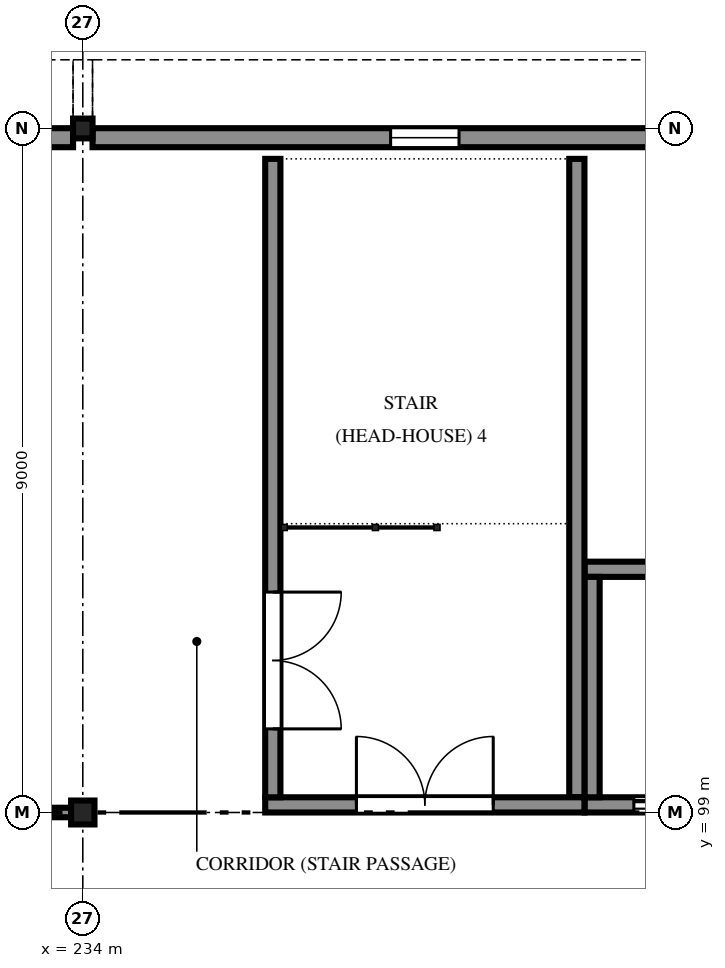
"""IFC4 building model, lengths in metres.
Left out: names, types, materials, properties, quantities, classifications, styles, units other than length and angle.
Written with IfcOpenShell. Run it as: python <this file> out.ifc"""

import sys

from ifc_helpers import new_model, si_unit, direction, frame, frame_2d, origin, origin_2d, place, context, subcontext, project, spatial, polyline, rectangle, i_section, outline, extrude, element, fill, save


model = new_model("IFC4")
c1 = context("Model", 3, precision=1e-05, world=origin(), true_north=direction((0.0, 1.0)))
c2 = subcontext(c1, "Body", "Model", "MODEL_VIEW")
j1 = project(units=[si_unit("LENGTHUNIT", "METRE"), si_unit("PLANEANGLEUNIT", "RADIAN")], contexts=[c1])
p1 = place(None, origin())
s1 = spatial("IfcSite", under=j1, at=p1, CompositionType="ELEMENT")
p2 = place(p1, origin())
s2 = spatial("IfcBuilding", under=s1, at=p2, CompositionType="ELEMENT")
p3 = place(p2, frame((0.0, 0.0, 7.5)))
s3 = spatial("IfcBuildingStorey", under=s2, at=p3, CompositionType="ELEMENT", Elevation=7.5)
p4 = place(p3, frame((234.0, 99.0, 0.0), z_axis=(0.0, 0.0, 1.0), x_axis=(1.0, 0.0, 0.0)))
e1 = element("IfcColumn", 1, at=p4, inside=s3, PredefinedType="COLUMN", context=c2, shape_type="SweptSolid", body=[
    extrude(i_section(OverallWidth=0.307, OverallDepth=0.314, WebThickness=0.012, FlangeThickness=0.019, FilletRadius=0.015, at=origin_2d()), origin(), (0.0, 0.0, 1.0), 4.2),
])
p5 = place(p3, frame((234.0, 108.0, 0.0), z_axis=(0.0, 0.0, 1.0), x_axis=(1.0, 0.0, 0.0)))
e2 = element("IfcColumn", 2, at=p5, inside=s3, PredefinedType="COLUMN", context=c2, shape_type="SweptSolid", body=[
    extrude(i_section(OverallWidth=0.256, OverallDepth=0.26, WebThickness=0.01, FlangeThickness=0.017, FilletRadius=0.013, at=origin_2d()), origin(), (0.0, 0.0, 1.0), 4.2),
])
p6 = place(p3, frame((225.128, 107.878, 0.0), z_axis=(0.0, 0.0, 1.0), x_axis=(1.0, 0.0, 0.0)))
e3 = element("IfcWall", 3, at=p6, inside=s3, PredefinedType="SOLIDWALL", context=c2, shape_type="SweptSolid", body=[
    extrude(rectangle(XDim=8.744, YDim=0.25, at=frame_2d((4.372, 0.0))), origin(), (0.0, 0.0, 1.0), 4.05),
])
p7 = place(p6, frame((0.622, 0.0, 0.9)))
e4 = element("IfcOpeningElement", 4, at=p7, cuts=e3, PredefinedType="OPENING", context=c2, shape_type="SweptSolid", body=[
    extrude(rectangle(XDim=1.5, YDim=2.4, at=frame_2d((0.75, 1.2))), frame((0.0, 0.135, 0.0), z_axis=(0.0, -1.0, 0.0), x_axis=(1.0, 0.0, 0.0)), (0.0, 0.0, 1.0), 0.27),
])
p8 = place(p6, frame((3.622, 0.0, 0.9)))
e5 = element("IfcOpeningElement", 5, at=p8, cuts=e3, PredefinedType="OPENING", context=c2, shape_type="SweptSolid", body=[
    extrude(rectangle(XDim=1.5, YDim=2.4, at=frame_2d((0.75, 1.2))), frame((0.0, 0.135, 0.0), z_axis=(0.0, -1.0, 0.0), x_axis=(1.0, 0.0, 0.0)), (0.0, 0.0, 1.0), 0.27),
])
p9 = place(p6, frame((6.622, 0.0, 0.9)))
e6 = element("IfcOpeningElement", 6, at=p9, cuts=e3, PredefinedType="OPENING", context=c2, shape_type="SweptSolid", body=[
    extrude(rectangle(XDim=1.5, YDim=2.4, at=frame_2d((0.75, 1.2))), frame((0.0, 0.135, 0.0), z_axis=(0.0, -1.0, 0.0), x_axis=(1.0, 0.0, 0.0)), (0.0, 0.0, 1.0), 0.27),
])
p10 = place(p3, frame((234.128, 107.878, 0.0), z_axis=(0.0, 0.0, 1.0), x_axis=(1.0, 0.0, 0.0)))
e7 = element("IfcWall", 7, at=p10, inside=s3, PredefinedType="SOLIDWALL", context=c2, shape_type="SweptSolid", body=[
    extrude(rectangle(XDim=8.744, YDim=0.25, at=frame_2d((4.372, 0.0))), origin(), (0.0, 0.0, 1.0), 4.05),
])
p11 = place(p10, frame((3.922, 0.0, 1.2)))
e8 = element("IfcOpeningElement", 8, at=p11, cuts=e7, PredefinedType="OPENING", context=c2, shape_type="SweptSolid", body=[
    extrude(rectangle(XDim=0.9, YDim=1.8, at=frame_2d((0.45, 0.9))), frame((0.0, 0.135, 0.0), z_axis=(0.0, -1.0, 0.0), x_axis=(1.0, 0.0, 0.0)), (0.0, 0.0, 1.0), 0.27),
])
p12 = place(p3, frame((236.4, 99.1, -0.13), z_axis=(0.0, 0.0, 1.0), x_axis=(1.0, 0.0, 0.0)))
e9 = element("IfcWall", 9, at=p12, inside=s3, PredefinedType="SOLIDWALL", context=c2, shape_type="SweptSolid", body=[
    extrude(rectangle(XDim=4.2, YDim=0.2, at=frame_2d((2.1, 0.0))), origin(), (0.0, 0.0, 1.0), 3.72),
])
p13 = place(p12, frame((1.2, 0.0, 0.13)))
e10 = element("IfcOpeningElement", 10, at=p13, cuts=e9, PredefinedType="OPENING", context=c2, shape_type="SweptSolid", body=[
    extrude(rectangle(XDim=1.8, YDim=2.1, at=frame_2d((0.9, 1.05))), frame((0.0, 0.11, 0.0), z_axis=(0.0, -1.0, 0.0), x_axis=(1.0, 0.0, 0.0)), (0.0, 0.0, 1.0), 0.22),
])
p14 = place(p3, frame((236.5, 99.2, -0.13), z_axis=(0.0, 0.0, 1.0), x_axis=(0.0, 1.0, 0.0)))
e11 = element("IfcWall", 11, at=p14, inside=s3, PredefinedType="SOLIDWALL", context=c2, shape_type="SweptSolid", body=[
    extrude(rectangle(XDim=8.4, YDim=0.2, at=frame_2d((4.2, 0.0))), origin(), (0.0, 0.0, 1.0), 3.72),
])
p15 = place(p14, frame((0.9, 0.0, 0.13)))
e12 = element("IfcOpeningElement", 12, at=p15, cuts=e11, PredefinedType="OPENING", context=c2, shape_type="SweptSolid", body=[
    extrude(rectangle(XDim=1.8, YDim=2.1, at=frame_2d((0.9, 1.05))), frame((0.0, 0.11, 0.0), z_axis=(0.0, -1.0, 0.0), x_axis=(1.0, 0.0, 0.0)), (0.0, 0.0, 1.0), 0.22),
])
p16 = place(p3, frame((240.5, 99.2, -0.13), z_axis=(0.0, 0.0, 1.0), x_axis=(0.0, 1.0, 0.0)))
e13 = element("IfcWall", 13, at=p16, inside=s3, PredefinedType="SOLIDWALL", context=c2, shape_type="SweptSolid", body=[
    extrude(rectangle(XDim=8.4, YDim=0.2, at=frame_2d((4.2, 0.0))), origin(), (0.0, 0.0, 1.0), 3.72),
])
p17 = place(p3, frame((240.602, 99.1, 0.0), z_axis=(0.0, 0.0, 1.0), x_axis=(1.0, 0.0, 0.0)))
e14 = element("IfcWall", 14, at=p17, inside=s3, PredefinedType="SOLIDWALL", context=c2, shape_type="SweptSolid", body=[
    extrude(rectangle(XDim=2.398, YDim=0.2, at=frame_2d((1.199, 0.0))), origin(), (0.0, 0.0, 1.0), 3.516),
])
p18 = place(p17, frame((0.648, 0.0, 0.0)))
e15 = element("IfcOpeningElement", 15, at=p18, cuts=e14, PredefinedType="OPENING", context=c2, shape_type="SweptSolid", body=[
    extrude(rectangle(XDim=1.1, YDim=2.1, at=frame_2d((0.55, 1.05))), frame((0.0, 0.11, 0.0), z_axis=(0.0, -1.0, 0.0), x_axis=(1.0, 0.0, 0.0)), (0.0, 0.0, 1.0), 0.22),
])
p19 = place(p3, frame((240.602, 102.2, 0.0), z_axis=(0.0, 0.0, 1.0), x_axis=(1.0, 0.0, 0.0)))
e16 = element("IfcWall", 16, at=p19, inside=s3, PredefinedType="SOLIDWALL", context=c2, shape_type="SweptSolid", body=[
    extrude(rectangle(XDim=2.256, YDim=0.2, at=frame_2d((1.128, 0.0))), origin(), (0.0, 0.0, 1.0), 3.516),
])
p20 = place(p3, frame((240.7, 99.2, 0.0), z_axis=(0.0, 0.0, 1.0), x_axis=(0.0, 1.0, 0.0)))
e17 = element("IfcWall", 17, at=p20, inside=s3, PredefinedType="SOLIDWALL", context=c2, shape_type="SweptSolid", body=[
    extrude(rectangle(XDim=2.9, YDim=0.2, at=frame_2d((1.45, 0.0))), origin(), (0.0, 0.0, 1.0), 3.516),
])
p21 = place(p3, frame((225.154, 99.0, 0.0), z_axis=(0.0, 0.0, 1.0), x_axis=(1.0, 0.0, 0.0)))
e18 = element("IfcWall", 18, at=p21, inside=s3, PredefinedType="PARTITIONING", context=c2, shape_type="SweptSolid", body=[
    extrude(rectangle(XDim=8.692, YDim=0.125, at=frame_2d((4.346, 0.0))), origin(), (0.0, 0.0, 1.0), 3.307),
])
p22 = place(p21, frame((3.846, 0.0, 0.0)))
e19 = element("IfcOpeningElement", 19, at=p22, cuts=e18, PredefinedType="OPENING", context=c2, shape_type="SweptSolid", body=[
    extrude(rectangle(XDim=1.0, YDim=2.1, at=frame_2d((0.5, 1.05))), frame((0.0, 0.073, 0.0), z_axis=(0.0, -1.0, 0.0), x_axis=(1.0, 0.0, 0.0)), (0.0, 0.0, 1.0), 0.145),
])
p23 = place(p11, origin())
e20 = element("IfcWindow", 20, at=p23, inside=s3, PartitioningType="SINGLE_PANEL", PredefinedType="WINDOW", context=c2, shape_type="SweptSolid", body=[
    extrude(outline(polyline([(0.0, 0.0), (0.9, 0.0), (0.9, 1.8), (0.0, 1.8), (0.0, 0.0)]), holes=[polyline([(0.07, 0.07), (0.83, 0.07), (0.83, 1.73), (0.07, 1.73), (0.07, 0.07)])]), frame((0.0, 0.03, 0.0), z_axis=(0.0, -1.0, 0.0), x_axis=(1.0, 0.0, 0.0)), (0.0, 0.0, 1.0), 0.06),
    extrude(outline(polyline([(0.07, 0.07), (0.83, 0.07), (0.83, 1.73), (0.07, 1.73), (0.07, 0.07)]), holes=[polyline([(0.1, 0.1), (0.8, 0.1), (0.8, 1.7), (0.1, 1.7), (0.1, 0.1)])]), frame((0.0, 0.022, 0.0), z_axis=(0.0, -1.0, 0.0), x_axis=(1.0, 0.0, 0.0)), (0.0, 0.0, 1.0), 0.045),
    extrude(rectangle(XDim=0.7, YDim=1.6, at=frame_2d((0.45, 0.9))), frame((0.0, 0.006, 0.0), z_axis=(0.0, -1.0, 0.0), x_axis=(1.0, 0.0, 0.0)), (0.0, 0.0, 1.0), 0.012),
])
fill(e8, e20)
p24 = place(p18, origin())
e21 = element("IfcDoor", 21, at=p24, inside=s3, OperationType="SLIDING_TO_LEFT", PredefinedType="DOOR", context=c2, shape_type="SweptSolid", body=[
    extrude(outline(polyline([(0.0, 0.0), (0.07, 0.0), (0.07, 2.03), (1.03, 2.03), (1.03, 0.0), (1.1, 0.0), (1.1, 2.1), (0.0, 2.1), (0.0, 0.0)])), frame((0.0, 0.025, 0.0), z_axis=(0.0, -1.0, 0.0), x_axis=(1.0, 0.0, 0.0)), (0.0, 0.0, 1.0), 0.05),
    extrude(rectangle(XDim=0.524, YDim=2.016, at=frame_2d((0.336, 1.018))), frame((0.0, 0.018, 0.0), z_axis=(0.0, -1.0, 0.0), x_axis=(1.0, 0.0, 0.0)), (0.0, 0.0, 1.0), 0.016),
    extrude(rectangle(XDim=0.52, YDim=2.016, at=frame_2d((0.766, 1.018))), frame((0.0, -0.002, 0.0), z_axis=(0.0, -1.0, 0.0), x_axis=(1.0, 0.0, 0.0)), (0.0, 0.0, 1.0), 0.016),
])
fill(e15, e21)
p25 = place(p15, frame((1.8, 0.0, 0.0), z_axis=(0.0, 0.0, 1.0), x_axis=(-1.0, 0.0, 0.0)))
e22 = element("IfcDoor", 22, at=p25, inside=s3, OperationType="DOUBLE_DOOR_SINGLE_SWING", PredefinedType="DOOR", context=c2, shape_type="SweptSolid", body=[
    extrude(outline(polyline([(0.0, 0.0), (0.07, 0.0), (0.07, 2.03), (1.73, 2.03), (1.73, 0.0), (1.8, 0.0), (1.8, 2.1), (0.0, 2.1), (0.0, 0.0)])), frame((0.0, 0.025, 0.0), z_axis=(0.0, -1.0, 0.0), x_axis=(1.0, 0.0, 0.0)), (0.0, 0.0, 1.0), 0.05),
    extrude(outline(polyline([(0.074, 0.01), (0.897, 0.01), (0.897, 2.026), (0.074, 2.026), (0.074, 0.01)]), holes=[polyline([(0.194, 0.16), (0.777, 0.16), (0.777, 1.01), (0.194, 1.01), (0.194, 0.16)]), polyline([(0.335, 1.16), (0.635, 1.16), (0.635, 1.76), (0.335, 1.76), (0.335, 1.16)])]), frame((0.0, 0.017, 0.0), z_axis=(0.0, -1.0, 0.0), x_axis=(1.0, 0.0, 0.0)), (0.0, 0.0, 1.0), 0.035),
    extrude(rectangle(XDim=0.583, YDim=0.85, at=frame_2d((0.485, 0.585))), frame((0.0, 0.009, 0.0), z_axis=(0.0, -1.0, 0.0), x_axis=(1.0, 0.0, 0.0)), (0.0, 0.0, 1.0), 0.017),
    extrude(rectangle(XDim=0.3, YDim=0.6, at=frame_2d((0.485, 1.46))), frame((0.0, 0.006, 0.0), z_axis=(0.0, -1.0, 0.0), x_axis=(1.0, 0.0, 0.0)), (0.0, 0.0, 1.0), 0.012),
    extrude(outline(polyline([(0.903, 0.01), (1.726, 0.01), (1.726, 2.026), (0.903, 2.026), (0.903, 0.01)]), holes=[polyline([(1.023, 0.16), (1.606, 0.16), (1.606, 1.01), (1.023, 1.01), (1.023, 0.16)]), polyline([(1.165, 1.16), (1.465, 1.16), (1.465, 1.76), (1.165, 1.76), (1.165, 1.16)])]), frame((0.0, 0.017, 0.0), z_axis=(0.0, -1.0, 0.0), x_axis=(1.0, 0.0, 0.0)), (0.0, 0.0, 1.0), 0.035),
    extrude(rectangle(XDim=0.583, YDim=0.85, at=frame_2d((1.314, 0.585))), frame((0.0, 0.009, 0.0), z_axis=(0.0, -1.0, 0.0), x_axis=(1.0, 0.0, 0.0)), (0.0, 0.0, 1.0), 0.017),
    extrude(rectangle(XDim=0.3, YDim=0.6, at=frame_2d((1.314, 1.46))), frame((0.0, 0.006, 0.0), z_axis=(0.0, -1.0, 0.0), x_axis=(1.0, 0.0, 0.0)), (0.0, 0.0, 1.0), 0.012),
])
fill(e12, e22)
p26 = place(p13, origin())
e23 = element("IfcDoor", 23, at=p26, inside=s3, OperationType="DOUBLE_DOOR_SINGLE_SWING", PredefinedType="DOOR", context=c2, shape_type="SweptSolid", body=[
    extrude(outline(polyline([(0.0, 0.0), (0.07, 0.0), (0.07, 2.03), (1.73, 2.03), (1.73, 0.0), (1.8, 0.0), (1.8, 2.1), (0.0, 2.1), (0.0, 0.0)])), frame((0.0, 0.025, 0.0), z_axis=(0.0, -1.0, 0.0), x_axis=(1.0, 0.0, 0.0)), (0.0, 0.0, 1.0), 0.05),
    extrude(outline(polyline([(0.074, 0.01), (0.897, 0.01), (0.897, 2.026), (0.074, 2.026), (0.074, 0.01)]), holes=[polyline([(0.194, 0.16), (0.777, 0.16), (0.777, 1.01), (0.194, 1.01), (0.194, 0.16)]), polyline([(0.335, 1.16), (0.635, 1.16), (0.635, 1.76), (0.335, 1.76), (0.335, 1.16)])]), frame((0.0, 0.017, 0.0), z_axis=(0.0, -1.0, 0.0), x_axis=(1.0, 0.0, 0.0)), (0.0, 0.0, 1.0), 0.035),
    extrude(rectangle(XDim=0.583, YDim=0.85, at=frame_2d((0.485, 0.585))), frame((0.0, 0.009, 0.0), z_axis=(0.0, -1.0, 0.0), x_axis=(1.0, 0.0, 0.0)), (0.0, 0.0, 1.0), 0.017),
    extrude(rectangle(XDim=0.3, YDim=0.6, at=frame_2d((0.485, 1.46))), frame((0.0, 0.006, 0.0), z_axis=(0.0, -1.0, 0.0), x_axis=(1.0, 0.0, 0.0)), (0.0, 0.0, 1.0), 0.012),
    extrude(outline(polyline([(0.903, 0.01), (1.726, 0.01), (1.726, 2.026), (0.903, 2.026), (0.903, 0.01)]), holes=[polyline([(1.023, 0.16), (1.606, 0.16), (1.606, 1.01), (1.023, 1.01), (1.023, 0.16)]), polyline([(1.165, 1.16), (1.465, 1.16), (1.465, 1.76), (1.165, 1.76), (1.165, 1.16)])]), frame((0.0, 0.017, 0.0), z_axis=(0.0, -1.0, 0.0), x_axis=(1.0, 0.0, 0.0)), (0.0, 0.0, 1.0), 0.035),
    extrude(rectangle(XDim=0.583, YDim=0.85, at=frame_2d((1.314, 0.585))), frame((0.0, 0.009, 0.0), z_axis=(0.0, -1.0, 0.0), x_axis=(1.0, 0.0, 0.0)), (0.0, 0.0, 1.0), 0.017),
    extrude(rectangle(XDim=0.3, YDim=0.6, at=frame_2d((1.314, 1.46))), frame((0.0, 0.006, 0.0), z_axis=(0.0, -1.0, 0.0), x_axis=(1.0, 0.0, 0.0)), (0.0, 0.0, 1.0), 0.012),
])
fill(e10, e23)
save(model, sys.argv[1])
